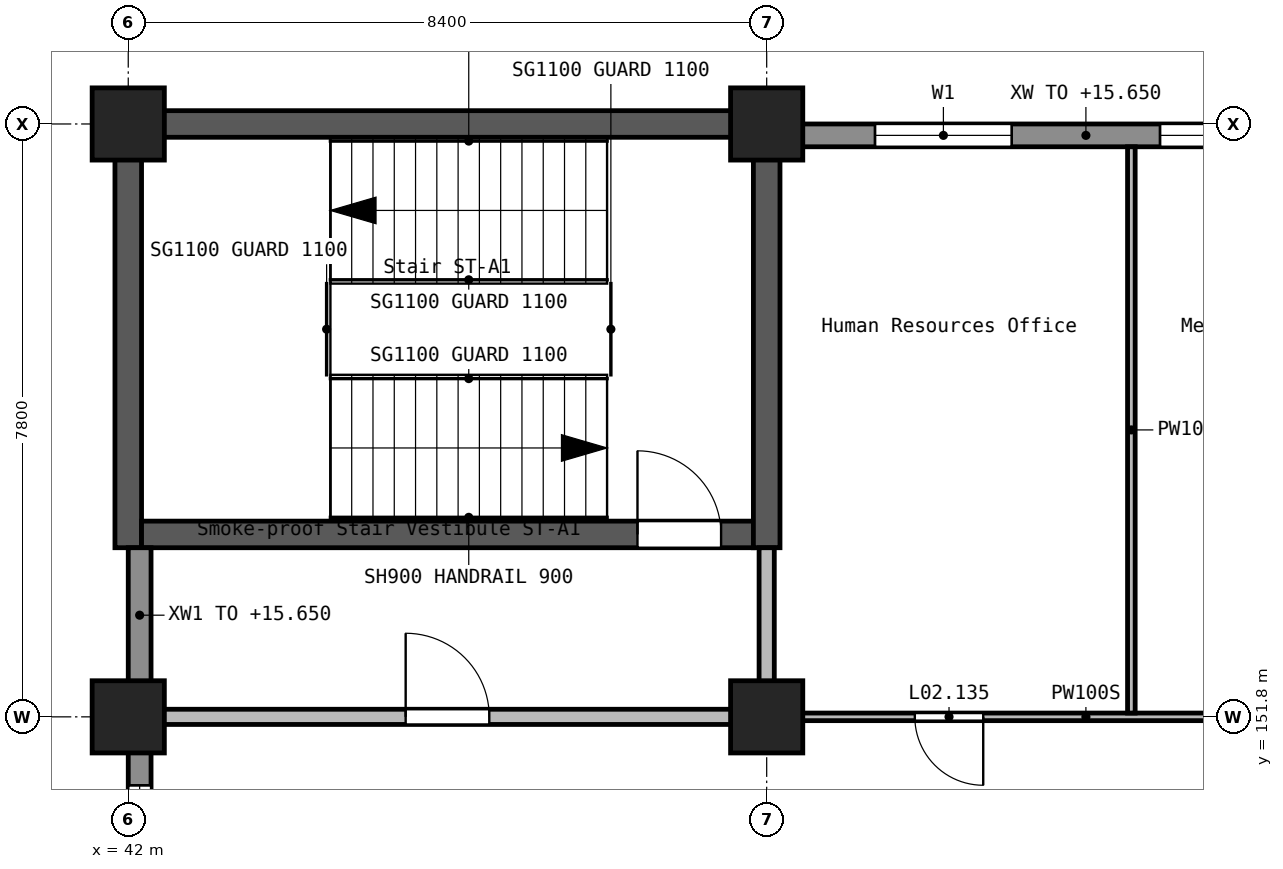
"""IFC4 building model, lengths in metres.
Left out: names, types, materials, properties, quantities, classifications, styles, units other than length and angle.
Written with IfcOpenShell. Run it as: python <this file> out.ifc"""

import sys

from ifc_helpers import new_model, si_unit, direction, frame, frame_2d, origin, origin_2d, place, context, subcontext, project, spatial, rectangle, extrude, element, fill, save


model = new_model("IFC4")
c1 = context("Model", 3, precision=1e-05, world=origin(), true_north=direction((0.0, 1.0)))
c2 = subcontext(c1, "Body", "Model", "MODEL_VIEW")
j1 = project(units=[si_unit("LENGTHUNIT", "METRE"), si_unit("PLANEANGLEUNIT", "RADIAN")], contexts=[c1])
p1 = place(None, origin())
s1 = spatial("IfcSite", under=j1, at=p1, CompositionType="ELEMENT")
p2 = place(p1, origin())
s2 = spatial("IfcBuilding", under=s1, at=p2, CompositionType="ELEMENT")
p3 = place(p2, frame((0.0, 0.0, 12.6)))
s3 = spatial("IfcBuildingStorey", under=s2, at=p3, CompositionType="ELEMENT", Elevation=12.6)
for number, where, z_axis, x_axis in (
    (1, (42.0, 151.8, 0.0), (0.0, 0.0, 1.0), (1.0, 0.0, 0.0)),
    (2, (42.0, 159.6, 0.0), (0.0, 0.0, 1.0), (1.0, 0.0, 0.0)),
    (3, (50.4, 151.8, 0.0), (0.0, 0.0, 1.0), (1.0, 0.0, 0.0)),
    (4, (50.4, 159.6, 0.0), (0.0, 0.0, 1.0), (1.0, 0.0, 0.0)),
):
    element("IfcColumn", number, at=place(p3, frame(where, z_axis=z_axis, x_axis=x_axis)), inside=s3, PredefinedType="COLUMN", context=c2, shape_type="SweptSolid", body=[
        extrude(rectangle(XDim=0.95, YDim=0.95, at=origin_2d()), origin(), (0.0, 0.0, 1.0), 4.2),
    ])
p4 = place(p3, frame((41.825, 159.6, 0.0), z_axis=(0.0, 0.0, 1.0), x_axis=(1.0, 0.0, 0.0)))
e5 = element("IfcWall", 5, at=p4, inside=s3, PredefinedType="SHEAR", context=c2, shape_type="SweptSolid", body=[
    extrude(rectangle(XDim=8.4, YDim=0.35, at=frame_2d((4.2, 0.0))), origin(), (0.0, 0.0, 1.0), 4.2),
])
p5 = place(p3, frame((42.0, 154.025, 0.0), z_axis=(0.0, 0.0, 1.0), x_axis=(0.0, 1.0, 0.0)))
e6 = element("IfcWall", 6, at=p5, inside=s3, PredefinedType="SHEAR", context=c2, shape_type="SweptSolid", body=[
    extrude(rectangle(XDim=5.4, YDim=0.35, at=frame_2d((2.7, 0.0))), origin(), (0.0, 0.0, 1.0), 4.2),
])
p6 = place(p3, frame((42.175, 154.2, 0.0), z_axis=(0.0, 0.0, 1.0), x_axis=(1.0, 0.0, 0.0)))
e7 = element("IfcWall", 7, at=p6, inside=s3, PredefinedType="SHEAR", context=c2, shape_type="SweptSolid", body=[
    extrude(rectangle(XDim=8.05, YDim=0.35, at=frame_2d((4.025, 0.0))), origin(), (0.0, 0.0, 1.0), 4.2),
])
p7 = place(p6, frame((6.525, 0.0, 0.0)))
e8 = element("IfcOpeningElement", 8, at=p7, cuts=e7, PredefinedType="OPENING", context=c2, shape_type="SweptSolid", body=[
    extrude(rectangle(XDim=1.1, YDim=2.1, at=frame_2d((0.55, 1.05))), frame((0.0, 0.185, 0.0), z_axis=(0.0, -1.0, 0.0), x_axis=(1.0, 0.0, 0.0)), (0.0, 0.0, 1.0), 0.37),
])
p8 = place(p3, frame((50.4, 154.025, 0.0), z_axis=(0.0, 0.0, 1.0), x_axis=(0.0, 1.0, 0.0)))
e9 = element("IfcWall", 9, at=p8, inside=s3, PredefinedType="SHEAR", context=c2, shape_type="SweptSolid", body=[
    extrude(rectangle(XDim=5.75, YDim=0.35, at=frame_2d((2.875, 0.0))), origin(), (0.0, 0.0, 1.0), 4.2),
])
p9 = place(p3, frame((58.35, 159.45, 0.0), z_axis=(0.0, 0.0, 1.0), x_axis=(-1.0, 0.0, 0.0)))
e10 = element("IfcWall", 10, at=p9, inside=s3, PredefinedType="STANDARD", context=c2, shape_type="SweptSolid", body=[
    extrude(rectangle(XDim=7.5, YDim=0.3, at=frame_2d((3.75, 0.0))), origin(), (0.0, 0.0, 1.0), 3.05),
])
p10 = place(p9, frame((0.975, 0.0, 0.9)))
e11 = element("IfcOpeningElement", 11, at=p10, cuts=e10, PredefinedType="OPENING", context=c2, shape_type="SweptSolid", body=[
    extrude(rectangle(XDim=1.8, YDim=1.5, at=frame_2d((0.9, 0.75))), frame((0.0, 0.16, 0.0), z_axis=(0.0, -1.0, 0.0), x_axis=(1.0, 0.0, 0.0)), (0.0, 0.0, 1.0), 0.32),
])
p11 = place(p9, frame((4.725, 0.0, 0.9)))
e12 = element("IfcOpeningElement", 12, at=p11, cuts=e10, PredefinedType="OPENING", context=c2, shape_type="SweptSolid", body=[
    extrude(rectangle(XDim=1.8, YDim=1.5, at=frame_2d((0.9, 0.75))), frame((0.0, 0.16, 0.0), z_axis=(0.0, -1.0, 0.0), x_axis=(1.0, 0.0, 0.0)), (0.0, 0.0, 1.0), 0.32),
])
p12 = place(p3, frame((42.15, 154.025, 0.0), z_axis=(0.0, 0.0, 1.0), x_axis=(0.0, -1.0, 0.0)))
e13 = element("IfcWall", 13, at=p12, inside=s3, PredefinedType="STANDARD", context=c2, shape_type="SweptSolid", body=[
    extrude(rectangle(XDim=1.775, YDim=0.3, at=frame_2d((0.887, 0.0))), origin(), (0.0, 0.0, 1.0), 3.05),
])
p13 = place(p3, frame((42.15, 151.35, 0.0), z_axis=(0.0, 0.0, 1.0), x_axis=(0.0, -1.0, 0.0)))
e14 = element("IfcWall", 14, at=p13, inside=s3, PredefinedType="STANDARD", context=c2, shape_type="SweptSolid", body=[
    extrude(rectangle(XDim=2.7, YDim=0.3, at=frame_2d((1.35, 0.0))), origin(), (0.0, 0.0, 1.0), 3.05),
])
p14 = place(p13, frame((0.45, 0.0, 0.9)))
e15 = element("IfcOpeningElement", 15, at=p14, cuts=e14, PredefinedType="OPENING", context=c2, shape_type="SweptSolid", body=[
    extrude(rectangle(XDim=1.8, YDim=1.5, at=frame_2d((0.9, 0.75))), frame((0.0, 0.16, 0.0), z_axis=(0.0, -1.0, 0.0), x_axis=(1.0, 0.0, 0.0)), (0.0, 0.0, 1.0), 0.32),
])
p15 = place(p3, frame((42.45, 151.8, 0.0), z_axis=(0.0, 0.0, 1.0), x_axis=(1.0, 0.0, 0.0)))
e16 = element("IfcWall", 16, at=p15, inside=s3, PredefinedType="SOLIDWALL", context=c2, shape_type="SweptSolid", body=[
    extrude(rectangle(XDim=7.5, YDim=0.2, at=frame_2d((3.75, 0.0))), origin(), (0.0, 0.0, 1.0), 3.85),
])
p16 = place(p15, frame((3.2, 0.0, 0.0)))
e17 = element("IfcOpeningElement", 17, at=p16, cuts=e16, PredefinedType="OPENING", context=c2, shape_type="SweptSolid", body=[
    extrude(rectangle(XDim=1.1, YDim=2.1, at=frame_2d((0.55, 1.05))), frame((0.0, 0.11, 0.0), z_axis=(0.0, -1.0, 0.0), x_axis=(1.0, 0.0, 0.0)), (0.0, 0.0, 1.0), 0.22),
])
p17 = place(p3, frame((50.4, 152.25, 0.0), z_axis=(0.0, 0.0, 1.0), x_axis=(0.0, 1.0, 0.0)))
e18 = element("IfcWall", 18, at=p17, inside=s3, PredefinedType="SOLIDWALL", context=c2, shape_type="SweptSolid", body=[
    extrude(rectangle(XDim=1.775, YDim=0.2, at=frame_2d((0.887, 0.0))), origin(), (0.0, 0.0, 1.0), 3.85),
])
p18 = place(p3, frame((58.35, 151.8, 0.0), z_axis=(0.0, 0.0, 1.0), x_axis=(-1.0, 0.0, 0.0)))
e19 = element("IfcWall", 19, at=p18, inside=s3, PredefinedType="PARTITIONING", context=c2, shape_type="SweptSolid", body=[
    extrude(rectangle(XDim=7.5, YDim=0.1, at=frame_2d((3.75, 0.0))), origin(), (0.0, 0.0, 1.0), 3.85),
])
p19 = place(p18, frame((5.101, 0.0, 0.0)))
e20 = element("IfcOpeningElement", 20, at=p19, cuts=e19, PredefinedType="OPENING", context=c2, shape_type="SweptSolid", body=[
    extrude(rectangle(XDim=0.9, YDim=2.1, at=frame_2d((0.45, 1.05))), frame((0.0, 0.06, 0.0), z_axis=(0.0, -1.0, 0.0), x_axis=(1.0, 0.0, 0.0)), (0.0, 0.0, 1.0), 0.12),
])
p20 = place(p18, frame((0.902, 0.0, 0.0)))
e21 = element("IfcOpeningElement", 21, at=p20, cuts=e19, PredefinedType="OPENING", context=c2, shape_type="SweptSolid", body=[
    extrude(rectangle(XDim=0.9, YDim=2.1, at=frame_2d((0.45, 1.05))), frame((0.0, 0.06, 0.0), z_axis=(0.0, -1.0, 0.0), x_axis=(1.0, 0.0, 0.0)), (0.0, 0.0, 1.0), 0.12),
])
p21 = place(p3, frame((55.198, 151.85, 0.0), z_axis=(0.0, 0.0, 1.0), x_axis=(0.0, 1.0, 0.0)))
e22 = element("IfcWall", 22, at=p21, inside=s3, PredefinedType="PARTITIONING", context=c2, shape_type="SweptSolid", body=[
    extrude(rectangle(XDim=7.45, YDim=0.1, at=frame_2d((3.725, 0.0))), origin(), (0.0, 0.0, 1.0), 3.85),
])
p22 = place(p10, origin())
e23 = element("IfcWindow", 23, at=p22, inside=s3, PartitioningType="SINGLE_PANEL", PredefinedType="WINDOW", context=c2, shape_type="SweptSolid", body=[
    extrude(rectangle(XDim=1.8, YDim=1.5, at=frame_2d((0.9, 0.75))), frame((0.0, 0.03, 0.0), z_axis=(0.0, -1.0, 0.0), x_axis=(1.0, 0.0, 0.0)), (0.0, 0.0, 1.0), 0.06),
])
fill(e11, e23)
p23 = place(p11, origin())
e24 = element("IfcWindow", 24, at=p23, inside=s3, PartitioningType="SINGLE_PANEL", PredefinedType="WINDOW", context=c2, shape_type="SweptSolid", body=[
    extrude(rectangle(XDim=1.8, YDim=1.5, at=frame_2d((0.9, 0.75))), frame((0.0, 0.03, 0.0), z_axis=(0.0, -1.0, 0.0), x_axis=(1.0, 0.0, 0.0)), (0.0, 0.0, 1.0), 0.06),
])
fill(e12, e24)
p24 = place(p14, origin())
e25 = element("IfcWindow", 25, at=p24, inside=s3, PartitioningType="SINGLE_PANEL", PredefinedType="WINDOW", context=c2, shape_type="SweptSolid", body=[
    extrude(rectangle(XDim=1.8, YDim=1.5, at=frame_2d((0.9, 0.75))), frame((0.0, 0.03, 0.0), z_axis=(0.0, -1.0, 0.0), x_axis=(1.0, 0.0, 0.0)), (0.0, 0.0, 1.0), 0.06),
])
fill(e15, e25)
p25 = place(p7, origin())
e26 = element("IfcDoor", 26, at=p25, inside=s3, OperationType="SINGLE_SWING_RIGHT", PredefinedType="DOOR", context=c2, shape_type="SweptSolid", body=[
    extrude(rectangle(XDim=1.1, YDim=2.1, at=frame_2d((0.55, 1.05))), frame((0.0, 0.025, 0.0), z_axis=(0.0, -1.0, 0.0), x_axis=(1.0, 0.0, 0.0)), (0.0, 0.0, 1.0), 0.05),
])
fill(e8, e26)
p26 = place(p16, origin())
e27 = element("IfcDoor", 27, at=p26, inside=s3, OperationType="SINGLE_SWING_RIGHT", PredefinedType="DOOR", context=c2, shape_type="SweptSolid", body=[
    extrude(rectangle(XDim=1.1, YDim=2.1, at=frame_2d((0.55, 1.05))), frame((0.0, 0.025, 0.0), z_axis=(0.0, -1.0, 0.0), x_axis=(1.0, 0.0, 0.0)), (0.0, 0.0, 1.0), 0.05),
])
fill(e17, e27)
p27 = place(p19, frame((0.9, 0.0, 0.0), z_axis=(0.0, 0.0, 1.0), x_axis=(-1.0, 0.0, 0.0)))
e28 = element("IfcDoor", 28, at=p27, inside=s3, OperationType="SINGLE_SWING_LEFT", PredefinedType="DOOR", context=c2, shape_type="SweptSolid", body=[
    extrude(rectangle(XDim=0.9, YDim=2.1, at=frame_2d((0.45, 1.05))), frame((0.0, 0.025, 0.0), z_axis=(0.0, -1.0, 0.0), x_axis=(1.0, 0.0, 0.0)), (0.0, 0.0, 1.0), 0.05),
])
fill(e20, e28)
save(model, sys.argv[1])
